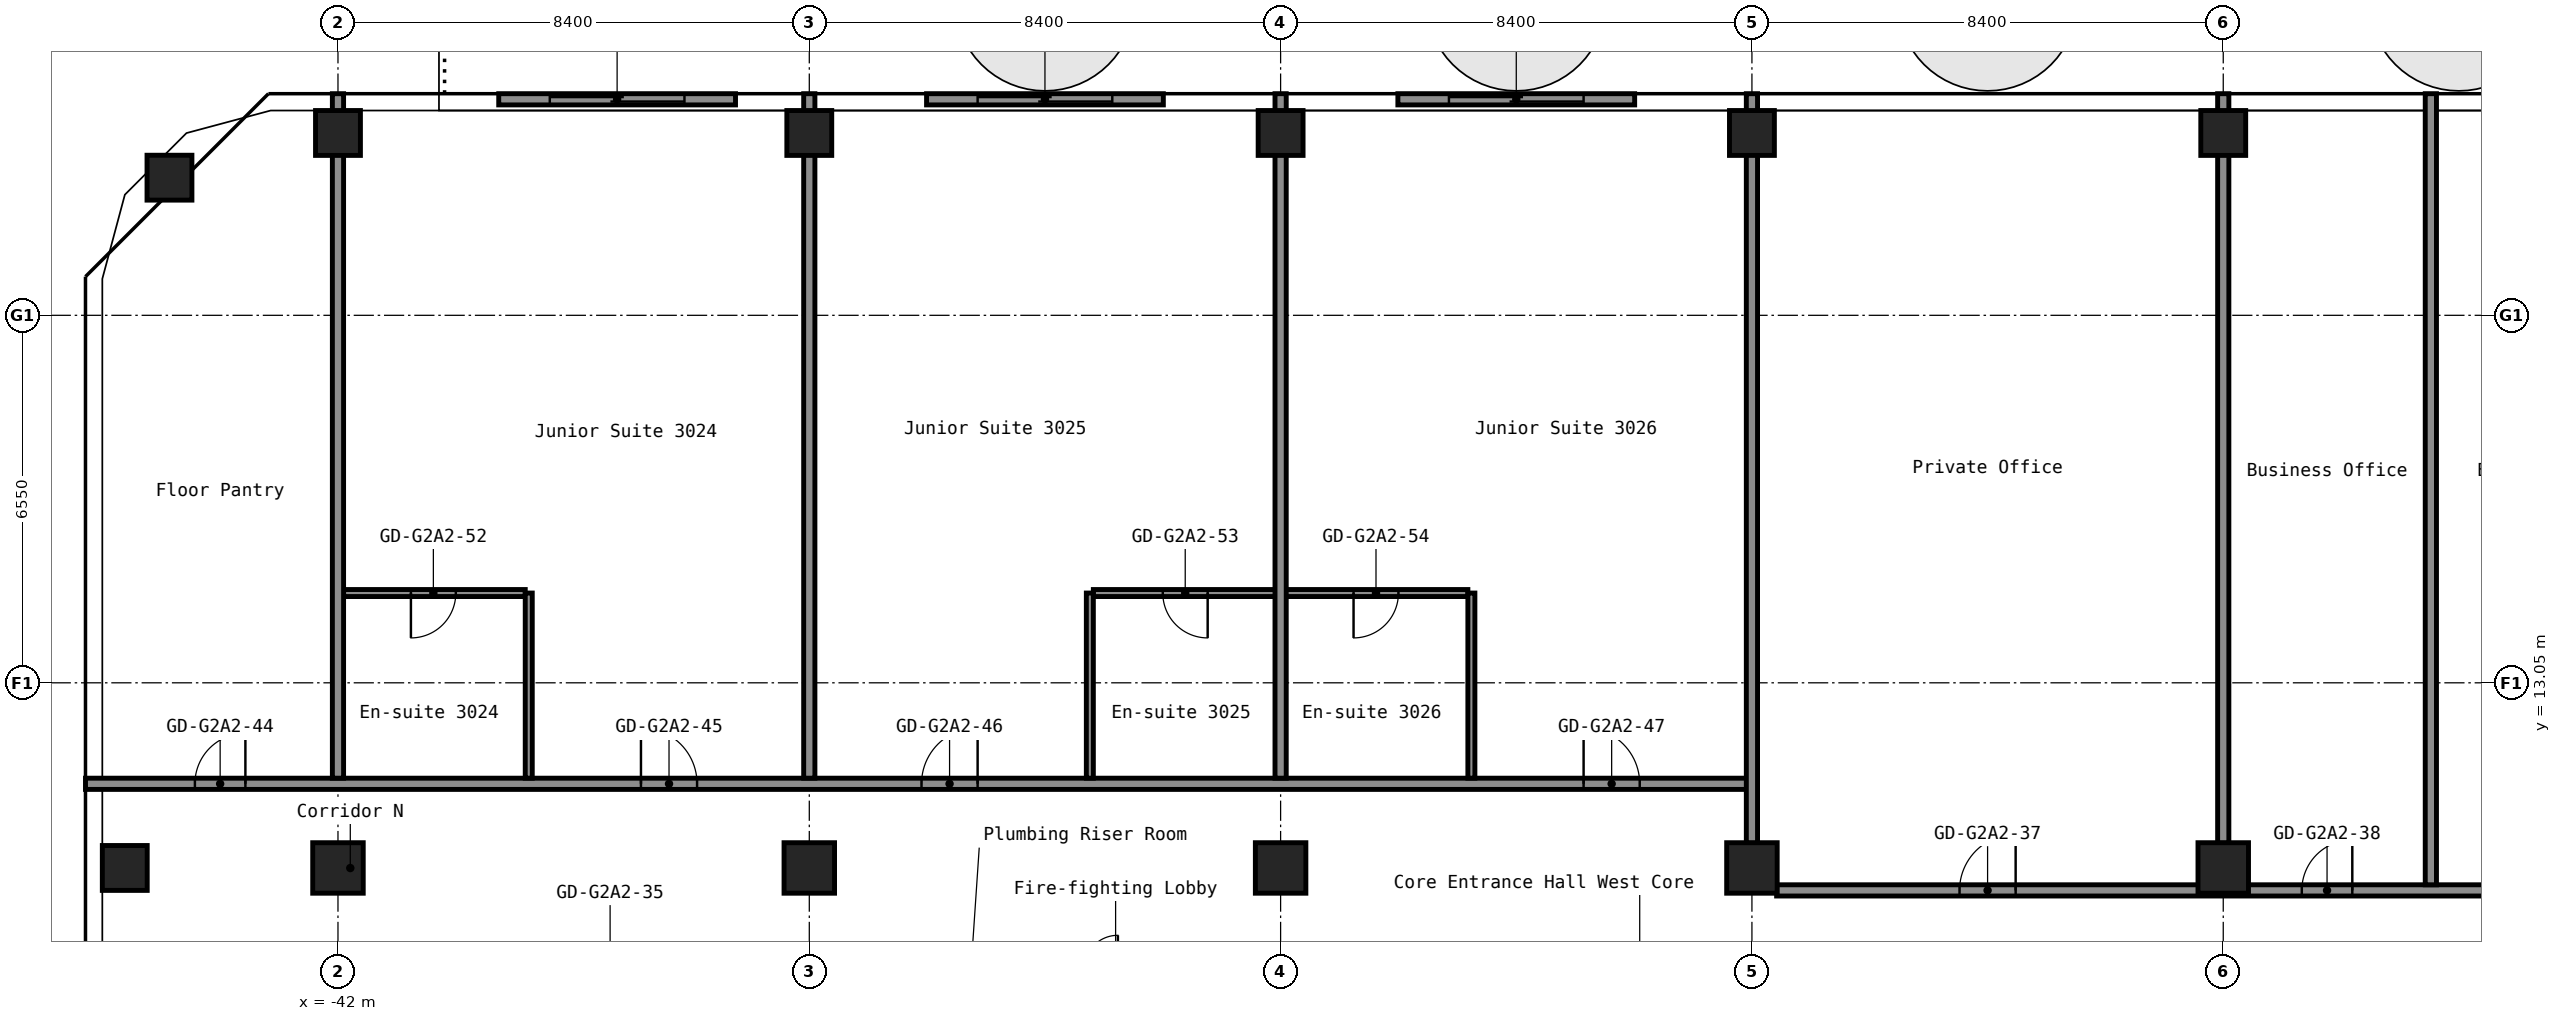
"""IFC4 building model, lengths in metres.
Left out: names, types, materials, properties, quantities, classifications, styles, units other than length and angle.
Written with IfcOpenShell. Run it as: python <this file> out.ifc"""

import sys

from ifc_helpers import new_model, si_unit, direction, frame, frame_2d, origin, origin_2d, place, context, subcontext, project, spatial, rectangle, hollow_rectangle, extrude, element, fill, save


model = new_model("IFC4")
c1 = context("Model", 3, precision=1e-05, world=origin(), true_north=direction((0.0, 1.0)))
c2 = subcontext(c1, "Body", "Model", "MODEL_VIEW")
j1 = project(units=[si_unit("LENGTHUNIT", "METRE"), si_unit("PLANEANGLEUNIT", "RADIAN")], contexts=[c1])
p1 = place(None, origin())
s1 = spatial("IfcSite", under=j1, at=p1, CompositionType="ELEMENT")
p2 = place(p1, origin())
s2 = spatial("IfcBuilding", under=s1, at=p2, CompositionType="ELEMENT")
p3 = place(p2, frame((0.0, 0.0, 107.4)))
s3 = spatial("IfcBuildingStorey", under=s2, at=p3, CompositionType="ELEMENT", Elevation=107.4)
for number, where, z_axis, x_axis in (
    (1, (-45.8, 9.75, 0.0), (0.0, 0.0, 1.0), (1.0, 0.0, 0.0)),
    (2, (-45.003, 22.053, 0.0), (0.0, 0.0, 1.0), (1.0, 0.0, 0.0)),
):
    element("IfcColumn", number, at=place(p3, frame(where, z_axis=z_axis, x_axis=x_axis)), inside=s3, PredefinedType="COLUMN", context=c2, shape_type="SweptSolid", body=[
        extrude(hollow_rectangle(XDim=0.8, YDim=0.8, WallThickness=0.032, at=origin_2d()), origin(), (0.0, 0.0, 1.0), 2.8),
    ])
p4 = place(p3, frame((-42.0, 9.75, 0.0), z_axis=(0.0, 0.0, 1.0), x_axis=(1.0, 0.0, 0.0)))
e3 = element("IfcColumn", 3, at=p4, inside=s3, PredefinedType="COLUMN", context=c2, shape_type="SweptSolid", body=[
    extrude(hollow_rectangle(XDim=0.9, YDim=0.9, WallThickness=0.036, at=origin_2d()), origin(), (0.0, 0.0, 1.0), 2.8),
])
p5 = place(p3, frame((-42.0, 22.85, 0.0), z_axis=(0.0, 0.0, 1.0), x_axis=(1.0, 0.0, 0.0)))
e4 = element("IfcColumn", 4, at=p5, inside=s3, PredefinedType="COLUMN", context=c2, shape_type="SweptSolid", body=[
    extrude(hollow_rectangle(XDim=0.8, YDim=0.8, WallThickness=0.032, at=origin_2d()), origin(), (0.0, 0.0, 1.0), 2.8),
])
p6 = place(p3, frame((-33.6, 9.75, 0.0), z_axis=(0.0, 0.0, 1.0), x_axis=(1.0, 0.0, 0.0)))
e5 = element("IfcColumn", 5, at=p6, inside=s3, PredefinedType="COLUMN", context=c2, shape_type="SweptSolid", body=[
    extrude(hollow_rectangle(XDim=0.9, YDim=0.9, WallThickness=0.036, at=origin_2d()), origin(), (0.0, 0.0, 1.0), 2.8),
])
p7 = place(p3, frame((-33.6, 22.85, 0.0), z_axis=(0.0, 0.0, 1.0), x_axis=(1.0, 0.0, 0.0)))
e6 = element("IfcColumn", 6, at=p7, inside=s3, PredefinedType="COLUMN", context=c2, shape_type="SweptSolid", body=[
    extrude(hollow_rectangle(XDim=0.8, YDim=0.8, WallThickness=0.032, at=origin_2d()), origin(), (0.0, 0.0, 1.0), 2.8),
])
p8 = place(p3, frame((-25.2, 9.75, 0.0), z_axis=(0.0, 0.0, 1.0), x_axis=(1.0, 0.0, 0.0)))
e7 = element("IfcColumn", 7, at=p8, inside=s3, PredefinedType="COLUMN", context=c2, shape_type="SweptSolid", body=[
    extrude(hollow_rectangle(XDim=0.9, YDim=0.9, WallThickness=0.036, at=origin_2d()), origin(), (0.0, 0.0, 1.0), 2.8),
])
p9 = place(p3, frame((-25.2, 22.85, 0.0), z_axis=(0.0, 0.0, 1.0), x_axis=(1.0, 0.0, 0.0)))
e8 = element("IfcColumn", 8, at=p9, inside=s3, PredefinedType="COLUMN", context=c2, shape_type="SweptSolid", body=[
    extrude(hollow_rectangle(XDim=0.8, YDim=0.8, WallThickness=0.032, at=origin_2d()), origin(), (0.0, 0.0, 1.0), 2.8),
])
p10 = place(p3, frame((-16.8, 9.75, 0.0), z_axis=(0.0, 0.0, 1.0), x_axis=(1.0, 0.0, 0.0)))
e9 = element("IfcColumn", 9, at=p10, inside=s3, PredefinedType="COLUMN", context=c2, shape_type="SweptSolid", body=[
    extrude(hollow_rectangle(XDim=0.9, YDim=0.9, WallThickness=0.036, at=origin_2d()), origin(), (0.0, 0.0, 1.0), 2.8),
])
p11 = place(p3, frame((-16.8, 22.85, 0.0), z_axis=(0.0, 0.0, 1.0), x_axis=(1.0, 0.0, 0.0)))
e10 = element("IfcColumn", 10, at=p11, inside=s3, PredefinedType="COLUMN", context=c2, shape_type="SweptSolid", body=[
    extrude(hollow_rectangle(XDim=0.8, YDim=0.8, WallThickness=0.032, at=origin_2d()), origin(), (0.0, 0.0, 1.0), 2.8),
])
p12 = place(p3, frame((-8.4, 9.75, 0.0), z_axis=(0.0, 0.0, 1.0), x_axis=(1.0, 0.0, 0.0)))
e11 = element("IfcColumn", 11, at=p12, inside=s3, PredefinedType="COLUMN", context=c2, shape_type="SweptSolid", body=[
    extrude(hollow_rectangle(XDim=0.9, YDim=0.9, WallThickness=0.036, at=origin_2d()), origin(), (0.0, 0.0, 1.0), 2.8),
])
p13 = place(p3, frame((-8.4, 22.85, 0.0), z_axis=(0.0, 0.0, 1.0), x_axis=(1.0, 0.0, 0.0)))
e12 = element("IfcColumn", 12, at=p13, inside=s3, PredefinedType="COLUMN", context=c2, shape_type="SweptSolid", body=[
    extrude(hollow_rectangle(XDim=0.8, YDim=0.8, WallThickness=0.032, at=origin_2d()), origin(), (0.0, 0.0, 1.0), 2.8),
])
p14 = place(p3, frame((-16.36, 9.35, 0.0), z_axis=(0.0, 0.0, 1.0), x_axis=(1.0, 0.0, 0.0)))
e13 = element("IfcWall", 13, at=p14, inside=s3, PredefinedType="PARTITIONING", context=c2, shape_type="SweptSolid", body=[
    extrude(rectangle(XDim=32.72, YDim=0.2, at=frame_2d((16.36, 0.0))), origin(), (0.0, 0.0, 1.0), 2.8),
])
p15 = place(p14, frame((3.26, 0.0, 0.0)))
e14 = element("IfcOpeningElement", 14, at=p15, cuts=e13, PredefinedType="OPENING", context=c2, shape_type="SweptSolid", body=[
    extrude(rectangle(XDim=1.0, YDim=2.1, at=frame_2d((0.5, 1.05))), frame((0.0, 0.11, 0.0), z_axis=(0.0, -1.0, 0.0), x_axis=(1.0, 0.0, 0.0)), (0.0, 0.0, 1.0), 0.22),
])
p16 = place(p14, frame((9.36, 0.0, 0.0)))
e15 = element("IfcOpeningElement", 15, at=p16, cuts=e13, PredefinedType="OPENING", context=c2, shape_type="SweptSolid", body=[
    extrude(rectangle(XDim=0.9, YDim=2.1, at=frame_2d((0.45, 1.05))), frame((0.0, 0.11, 0.0), z_axis=(0.0, -1.0, 0.0), x_axis=(1.0, 0.0, 0.0)), (0.0, 0.0, 1.0), 0.22),
])
p17 = place(p14, frame((13.56, 0.0, 0.0)))
e16 = element("IfcOpeningElement", 16, at=p17, cuts=e13, PredefinedType="OPENING", context=c2, shape_type="SweptSolid", body=[
    extrude(rectangle(XDim=0.9, YDim=2.1, at=frame_2d((0.45, 1.05))), frame((0.0, 0.11, 0.0), z_axis=(0.0, -1.0, 0.0), x_axis=(1.0, 0.0, 0.0)), (0.0, 0.0, 1.0), 0.22),
])
p18 = place(p14, frame((18.345, 0.0, 0.0)))
e17 = element("IfcOpeningElement", 17, at=p18, cuts=e13, PredefinedType="OPENING", context=c2, shape_type="SweptSolid", body=[
    extrude(rectangle(XDim=0.9, YDim=2.1, at=frame_2d((0.45, 1.05))), frame((0.0, 0.11, 0.0), z_axis=(0.0, -1.0, 0.0), x_axis=(1.0, 0.0, 0.0)), (0.0, 0.0, 1.0), 0.22),
])
p19 = place(p14, frame((22.545, 0.0, 0.0)))
e18 = element("IfcOpeningElement", 18, at=p19, cuts=e13, PredefinedType="OPENING", context=c2, shape_type="SweptSolid", body=[
    extrude(rectangle(XDim=0.9, YDim=2.1, at=frame_2d((0.45, 1.05))), frame((0.0, 0.11, 0.0), z_axis=(0.0, -1.0, 0.0), x_axis=(1.0, 0.0, 0.0)), (0.0, 0.0, 1.0), 0.22),
])
p20 = place(p14, frame((25.99, 0.0, 0.0)))
e19 = element("IfcOpeningElement", 19, at=p20, cuts=e13, PredefinedType="OPENING", context=c2, shape_type="SweptSolid", body=[
    extrude(rectangle(XDim=0.9, YDim=2.1, at=frame_2d((0.45, 1.05))), frame((0.0, 0.11, 0.0), z_axis=(0.0, -1.0, 0.0), x_axis=(1.0, 0.0, 0.0)), (0.0, 0.0, 1.0), 0.22),
])
p21 = place(p14, frame((30.19, 0.0, 0.0)))
e20 = element("IfcOpeningElement", 20, at=p21, cuts=e13, PredefinedType="OPENING", context=c2, shape_type="SweptSolid", body=[
    extrude(rectangle(XDim=0.9, YDim=2.1, at=frame_2d((0.45, 1.05))), frame((0.0, 0.11, 0.0), z_axis=(0.0, -1.0, 0.0), x_axis=(1.0, 0.0, 0.0)), (0.0, 0.0, 1.0), 0.22),
])
p22 = place(p3, frame((-46.5, 11.25, 0.0), z_axis=(0.0, 0.0, 1.0), x_axis=(1.0, 0.0, 0.0)))
e21 = element("IfcWall", 21, at=p22, inside=s3, PredefinedType="PARTITIONING", context=c2, shape_type="SweptSolid", body=[
    extrude(rectangle(XDim=29.7, YDim=0.2, at=frame_2d((14.85, 0.0))), origin(), (0.0, 0.0, 1.0), 2.8),
])
p23 = place(p22, frame((1.95, 0.0, 0.0)))
e22 = element("IfcOpeningElement", 22, at=p23, cuts=e21, PredefinedType="OPENING", context=c2, shape_type="SweptSolid", body=[
    extrude(rectangle(XDim=0.9, YDim=2.1, at=frame_2d((0.45, 1.05))), frame((0.0, 0.11, 0.0), z_axis=(0.0, -1.0, 0.0), x_axis=(1.0, 0.0, 0.0)), (0.0, 0.0, 1.0), 0.22),
])
p24 = place(p22, frame((9.9, 0.0, 0.0)))
e23 = element("IfcOpeningElement", 23, at=p24, cuts=e21, PredefinedType="OPENING", context=c2, shape_type="SweptSolid", body=[
    extrude(rectangle(XDim=1.0, YDim=2.1, at=frame_2d((0.5, 1.05))), frame((0.0, 0.11, 0.0), z_axis=(0.0, -1.0, 0.0), x_axis=(1.0, 0.0, 0.0)), (0.0, 0.0, 1.0), 0.22),
])
p25 = place(p22, frame((14.9, 0.0, 0.0)))
e24 = element("IfcOpeningElement", 24, at=p25, cuts=e21, PredefinedType="OPENING", context=c2, shape_type="SweptSolid", body=[
    extrude(rectangle(XDim=1.0, YDim=2.1, at=frame_2d((0.5, 1.05))), frame((0.0, 0.11, 0.0), z_axis=(0.0, -1.0, 0.0), x_axis=(1.0, 0.0, 0.0)), (0.0, 0.0, 1.0), 0.22),
])
p26 = place(p22, frame((26.7, 0.0, 0.0)))
e25 = element("IfcOpeningElement", 25, at=p26, cuts=e21, PredefinedType="OPENING", context=c2, shape_type="SweptSolid", body=[
    extrude(rectangle(XDim=1.0, YDim=2.1, at=frame_2d((0.5, 1.05))), frame((0.0, 0.11, 0.0), z_axis=(0.0, -1.0, 0.0), x_axis=(1.0, 0.0, 0.0)), (0.0, 0.0, 1.0), 0.22),
])
p27 = place(p3, frame((-41.9, 14.65, 0.0), z_axis=(0.0, 0.0, 1.0), x_axis=(1.0, 0.0, 0.0)))
e26 = element("IfcWall", 26, at=p27, inside=s3, PredefinedType="PARTITIONING", context=c2, shape_type="SweptSolid", body=[
    extrude(rectangle(XDim=3.237, YDim=0.125, at=frame_2d((1.619, 0.0))), origin(), (0.0, 0.0, 1.0), 2.8),
])
p28 = place(p27, frame((1.2, 0.0, 0.0)))
e27 = element("IfcOpeningElement", 27, at=p28, cuts=e26, PredefinedType="OPENING", context=c2, shape_type="SweptSolid", body=[
    extrude(rectangle(XDim=0.8, YDim=2.1, at=frame_2d((0.4, 1.05))), frame((0.0, 0.073, 0.0), z_axis=(0.0, -1.0, 0.0), x_axis=(1.0, 0.0, 0.0)), (0.0, 0.0, 1.0), 0.145),
])
p29 = place(p3, frame((-28.538, 14.65, 0.0), z_axis=(0.0, 0.0, 1.0), x_axis=(1.0, 0.0, 0.0)))
e28 = element("IfcWall", 28, at=p29, inside=s3, PredefinedType="PARTITIONING", context=c2, shape_type="SweptSolid", body=[
    extrude(rectangle(XDim=6.675, YDim=0.125, at=frame_2d((3.337, 0.0))), origin(), (0.0, 0.0, 1.0), 2.8),
])
p30 = place(p29, frame((1.238, 0.0, 0.0)))
e29 = element("IfcOpeningElement", 29, at=p30, cuts=e28, PredefinedType="OPENING", context=c2, shape_type="SweptSolid", body=[
    extrude(rectangle(XDim=0.8, YDim=2.1, at=frame_2d((0.4, 1.05))), frame((0.0, 0.073, 0.0), z_axis=(0.0, -1.0, 0.0), x_axis=(1.0, 0.0, 0.0)), (0.0, 0.0, 1.0), 0.145),
])
p31 = place(p29, frame((4.637, 0.0, 0.0)))
e30 = element("IfcOpeningElement", 30, at=p31, cuts=e28, PredefinedType="OPENING", context=c2, shape_type="SweptSolid", body=[
    extrude(rectangle(XDim=0.8, YDim=2.1, at=frame_2d((0.4, 1.05))), frame((0.0, 0.073, 0.0), z_axis=(0.0, -1.0, 0.0), x_axis=(1.0, 0.0, 0.0)), (0.0, 0.0, 1.0), 0.145),
])
p32 = place(p3, frame((-42.0, 11.35, 0.0), z_axis=(0.0, 0.0, 1.0), x_axis=(0.0, 1.0, 0.0)))
e31 = element("IfcWall", 31, at=p32, inside=s3, PredefinedType="PARTITIONING", context=c2, shape_type="SweptSolid", body=[
    extrude(rectangle(XDim=12.2, YDim=0.2, at=frame_2d((6.1, 0.0))), origin(), (0.0, 0.0, 1.0), 2.8),
])
p33 = place(p3, frame((-38.6, 11.35, 0.0), z_axis=(0.0, 0.0, 1.0), x_axis=(0.0, 1.0, 0.0)))
e32 = element("IfcWall", 32, at=p33, inside=s3, PredefinedType="PARTITIONING", context=c2, shape_type="SweptSolid", body=[
    extrude(rectangle(XDim=3.3, YDim=0.125, at=frame_2d((1.65, 0.0))), origin(), (0.0, 0.0, 1.0), 2.8),
])
p34 = place(p3, frame((-33.6, 11.35, 0.0), z_axis=(0.0, 0.0, 1.0), x_axis=(0.0, 1.0, 0.0)))
e33 = element("IfcWall", 33, at=p34, inside=s3, PredefinedType="PARTITIONING", context=c2, shape_type="SweptSolid", body=[
    extrude(rectangle(XDim=12.2, YDim=0.2, at=frame_2d((6.1, 0.0))), origin(), (0.0, 0.0, 1.0), 2.8),
])
p35 = place(p3, frame((-28.6, 11.35, 0.0), z_axis=(0.0, 0.0, 1.0), x_axis=(0.0, 1.0, 0.0)))
e34 = element("IfcWall", 34, at=p35, inside=s3, PredefinedType="PARTITIONING", context=c2, shape_type="SweptSolid", body=[
    extrude(rectangle(XDim=3.3, YDim=0.125, at=frame_2d((1.65, 0.0))), origin(), (0.0, 0.0, 1.0), 2.8),
])
p36 = place(p3, frame((-25.2, 11.35, 0.0), z_axis=(0.0, 0.0, 1.0), x_axis=(0.0, 1.0, 0.0)))
e35 = element("IfcWall", 35, at=p36, inside=s3, PredefinedType="PARTITIONING", context=c2, shape_type="SweptSolid", body=[
    extrude(rectangle(XDim=12.2, YDim=0.2, at=frame_2d((6.1, 0.0))), origin(), (0.0, 0.0, 1.0), 2.8),
])
p37 = place(p3, frame((-21.8, 11.35, 0.0), z_axis=(0.0, 0.0, 1.0), x_axis=(0.0, 1.0, 0.0)))
e36 = element("IfcWall", 36, at=p37, inside=s3, PredefinedType="PARTITIONING", context=c2, shape_type="SweptSolid", body=[
    extrude(rectangle(XDim=3.3, YDim=0.125, at=frame_2d((1.65, 0.0))), origin(), (0.0, 0.0, 1.0), 2.8),
])
for number, where, z_axis, x_axis in (
    (37, (-16.8, 10.19, 0.0), (0.0, 0.0, 1.0), (0.0, 1.0, 0.0)),
    (38, (-8.4, 10.19, 0.0), (0.0, 0.0, 1.0), (0.0, 1.0, 0.0)),
):
    element("IfcWall", number, at=place(p3, frame(where, z_axis=z_axis, x_axis=x_axis)), inside=s3, PredefinedType="PARTITIONING", context=c2, shape_type="SweptSolid", body=[
        extrude(rectangle(XDim=13.36, YDim=0.2, at=frame_2d((6.68, 0.0))), origin(), (0.0, 0.0, 1.0), 2.8),
    ])
p38 = place(p3, frame((-4.7, 9.45, 0.0), z_axis=(0.0, 0.0, 1.0), x_axis=(0.0, 1.0, 0.0)))
e39 = element("IfcWall", 39, at=p38, inside=s3, PredefinedType="PARTITIONING", context=c2, shape_type="SweptSolid", body=[
    extrude(rectangle(XDim=14.1, YDim=0.2, at=frame_2d((7.05, 0.0))), origin(), (0.0, 0.0, 1.0), 2.8),
])
p39 = place(p3, frame((-18.89, 23.45, 0.0), z_axis=(0.0, 0.0, 1.0), x_axis=(-1.0, 0.0, 0.0)))
p40 = place(p39, frame((0.91, 0.0, 0.0)))
p41 = place(p40, frame((2.4, 0.0, 0.0), z_axis=(0.0, 0.0, 1.0), x_axis=(-1.0, 0.0, 0.0)))
e40 = element("IfcDoor", 40, at=p41, inside=s3, OperationType="SLIDING_TO_LEFT", PredefinedType="DOOR", context=c2, shape_type="SweptSolid", body=[
    extrude(rectangle(XDim=2.4, YDim=2.2, at=frame_2d((1.2, 1.1))), frame((0.0, 0.025, 0.0), z_axis=(0.0, -1.0, 0.0), x_axis=(1.0, 0.0, 0.0)), (0.0, 0.0, 1.0), 0.05),
])
p42 = place(p3, frame((-27.29, 23.45, 0.0), z_axis=(0.0, 0.0, 1.0), x_axis=(-1.0, 0.0, 0.0)))
p43 = place(p42, frame((0.91, 0.0, 0.0)))
p44 = place(p43, frame((2.4, 0.0, 0.0), z_axis=(0.0, 0.0, 1.0), x_axis=(-1.0, 0.0, 0.0)))
e41 = element("IfcDoor", 41, at=p44, inside=s3, OperationType="SLIDING_TO_LEFT", PredefinedType="DOOR", context=c2, shape_type="SweptSolid", body=[
    extrude(rectangle(XDim=2.4, YDim=2.2, at=frame_2d((1.2, 1.1))), frame((0.0, 0.025, 0.0), z_axis=(0.0, -1.0, 0.0), x_axis=(1.0, 0.0, 0.0)), (0.0, 0.0, 1.0), 0.05),
])
p45 = place(p3, frame((-34.915, 23.45, 0.0), z_axis=(0.0, 0.0, 1.0), x_axis=(-1.0, 0.0, 0.0)))
p46 = place(p45, frame((0.91, 0.0, 0.0)))
p47 = place(p46, frame((2.4, 0.0, 0.0), z_axis=(0.0, 0.0, 1.0), x_axis=(-1.0, 0.0, 0.0)))
e42 = element("IfcDoor", 42, at=p47, inside=s3, OperationType="SLIDING_TO_LEFT", PredefinedType="DOOR", context=c2, shape_type="SweptSolid", body=[
    extrude(rectangle(XDim=2.4, YDim=2.2, at=frame_2d((1.2, 1.1))), frame((0.0, 0.025, 0.0), z_axis=(0.0, -1.0, 0.0), x_axis=(1.0, 0.0, 0.0)), (0.0, 0.0, 1.0), 0.05),
])
p48 = place(p15, origin())
e43 = element("IfcDoor", 43, at=p48, inside=s3, OperationType="SINGLE_SWING_LEFT", PredefinedType="DOOR", context=c2, shape_type="SweptSolid", body=[
    extrude(rectangle(XDim=1.0, YDim=2.1, at=frame_2d((0.5, 1.05))), frame((0.0, 0.025, 0.0), z_axis=(0.0, -1.0, 0.0), x_axis=(1.0, 0.0, 0.0)), (0.0, 0.0, 1.0), 0.05),
])
fill(e14, e43)
p49 = place(p16, origin())
e44 = element("IfcDoor", 44, at=p49, inside=s3, OperationType="SINGLE_SWING_LEFT", PredefinedType="DOOR", context=c2, shape_type="SweptSolid", body=[
    extrude(rectangle(XDim=0.9, YDim=2.1, at=frame_2d((0.45, 1.05))), frame((0.0, 0.025, 0.0), z_axis=(0.0, -1.0, 0.0), x_axis=(1.0, 0.0, 0.0)), (0.0, 0.0, 1.0), 0.05),
])
fill(e15, e44)
p50 = place(p23, origin())
e45 = element("IfcDoor", 45, at=p50, inside=s3, OperationType="SINGLE_SWING_LEFT", PredefinedType="DOOR", context=c2, shape_type="SweptSolid", body=[
    extrude(rectangle(XDim=0.9, YDim=2.1, at=frame_2d((0.45, 1.05))), frame((0.0, 0.025, 0.0), z_axis=(0.0, -1.0, 0.0), x_axis=(1.0, 0.0, 0.0)), (0.0, 0.0, 1.0), 0.05),
])
fill(e22, e45)
p51 = place(p24, origin())
e46 = element("IfcDoor", 46, at=p51, inside=s3, OperationType="SINGLE_SWING_RIGHT", PredefinedType="DOOR", context=c2, shape_type="SweptSolid", body=[
    extrude(rectangle(XDim=1.0, YDim=2.1, at=frame_2d((0.5, 1.05))), frame((0.0, 0.025, 0.0), z_axis=(0.0, -1.0, 0.0), x_axis=(1.0, 0.0, 0.0)), (0.0, 0.0, 1.0), 0.05),
])
fill(e23, e46)
p52 = place(p25, origin())
e47 = element("IfcDoor", 47, at=p52, inside=s3, OperationType="SINGLE_SWING_LEFT", PredefinedType="DOOR", context=c2, shape_type="SweptSolid", body=[
    extrude(rectangle(XDim=1.0, YDim=2.1, at=frame_2d((0.5, 1.05))), frame((0.0, 0.025, 0.0), z_axis=(0.0, -1.0, 0.0), x_axis=(1.0, 0.0, 0.0)), (0.0, 0.0, 1.0), 0.05),
])
fill(e24, e47)
p53 = place(p26, origin())
e48 = element("IfcDoor", 48, at=p53, inside=s3, OperationType="SINGLE_SWING_RIGHT", PredefinedType="DOOR", context=c2, shape_type="SweptSolid", body=[
    extrude(rectangle(XDim=1.0, YDim=2.1, at=frame_2d((0.5, 1.05))), frame((0.0, 0.025, 0.0), z_axis=(0.0, -1.0, 0.0), x_axis=(1.0, 0.0, 0.0)), (0.0, 0.0, 1.0), 0.05),
])
fill(e25, e48)
p54 = place(p28, origin())
e49 = element("IfcDoor", 49, at=p54, inside=s3, OperationType="SINGLE_SWING_LEFT", PredefinedType="DOOR", context=c2, shape_type="SweptSolid", body=[
    extrude(rectangle(XDim=0.8, YDim=2.1, at=frame_2d((0.4, 1.05))), frame((0.0, 0.025, 0.0), z_axis=(0.0, -1.0, 0.0), x_axis=(1.0, 0.0, 0.0)), (0.0, 0.0, 1.0), 0.05),
])
fill(e27, e49)
p55 = place(p30, origin())
e50 = element("IfcDoor", 50, at=p55, inside=s3, OperationType="SINGLE_SWING_RIGHT", PredefinedType="DOOR", context=c2, shape_type="SweptSolid", body=[
    extrude(rectangle(XDim=0.8, YDim=2.1, at=frame_2d((0.4, 1.05))), frame((0.0, 0.025, 0.0), z_axis=(0.0, -1.0, 0.0), x_axis=(1.0, 0.0, 0.0)), (0.0, 0.0, 1.0), 0.05),
])
fill(e29, e50)
p56 = place(p31, origin())
e51 = element("IfcDoor", 51, at=p56, inside=s3, OperationType="SINGLE_SWING_LEFT", PredefinedType="DOOR", context=c2, shape_type="SweptSolid", body=[
    extrude(rectangle(XDim=0.8, YDim=2.1, at=frame_2d((0.4, 1.05))), frame((0.0, 0.025, 0.0), z_axis=(0.0, -1.0, 0.0), x_axis=(1.0, 0.0, 0.0)), (0.0, 0.0, 1.0), 0.05),
])
fill(e30, e51)
save(model, sys.argv[1])
